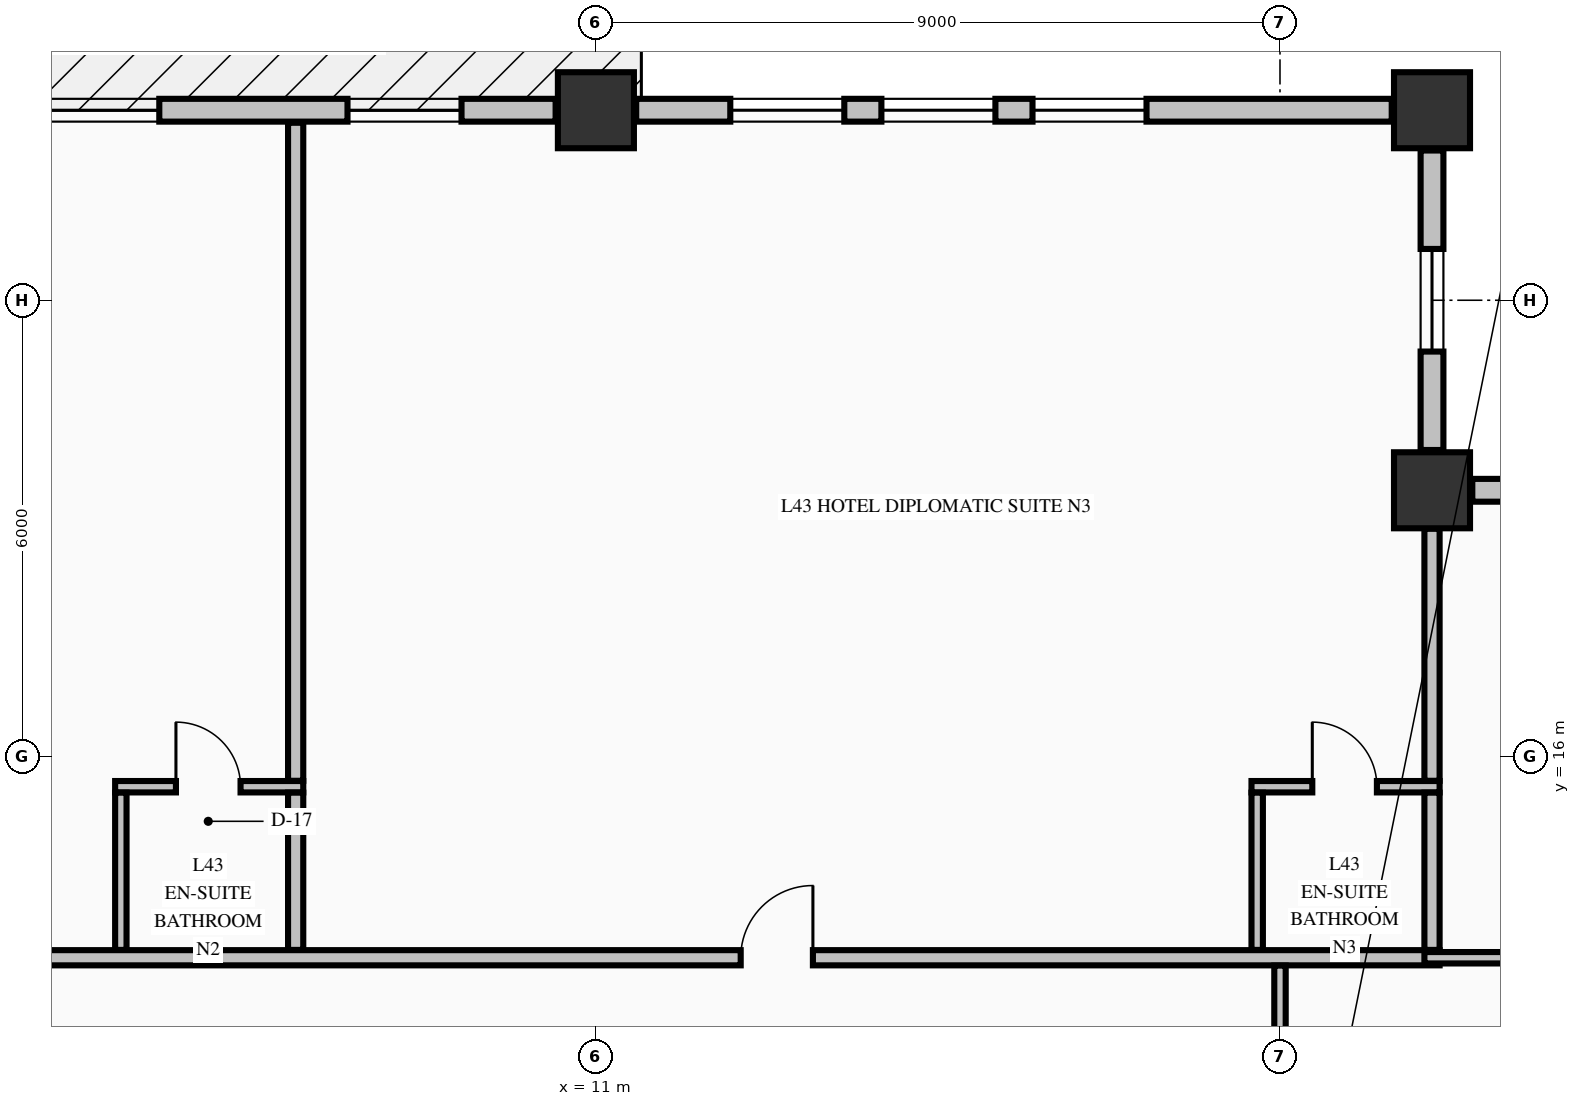
"""IFC4 building model, lengths in metres.
Left out: names, types, materials, properties, quantities, classifications, styles, units other than length and angle.
Written with IfcOpenShell. Run it as: python <this file> out.ifc"""

import sys

from ifc_helpers import new_model, si_unit, direction, frame, frame_2d, origin, origin_2d, place, context, subcontext, project, spatial, rectangle, extrude, element, fill, save


model = new_model("IFC4")
c1 = context("Model", 3, precision=1e-05, world=origin(), true_north=direction((0.0, 1.0)))
c2 = subcontext(c1, "Body", "Model", "MODEL_VIEW")
j1 = project(units=[si_unit("LENGTHUNIT", "METRE"), si_unit("PLANEANGLEUNIT", "RADIAN")], contexts=[c1])
p1 = place(None, origin())
s1 = spatial("IfcSite", under=j1, at=p1, CompositionType="ELEMENT")
p2 = place(p1, origin())
s2 = spatial("IfcBuilding", under=s1, at=p2, CompositionType="ELEMENT")
p3 = place(p2, frame((0.0, 0.0, 169.46)))
s3 = spatial("IfcBuildingStorey", under=s2, at=p3, CompositionType="ELEMENT", Elevation=169.46)
for number, where, z_axis, x_axis in (
    (1, (11.0, 24.5, -0.25), (0.0, 0.0, 1.0), (1.0, 0.0, 0.0)),
    (2, (22.0, 24.5, -0.25), (0.0, 0.0, 1.0), (1.0, 0.0, 0.0)),
    (3, (22.0, 19.5, -0.25), (0.0, 0.0, 1.0), (1.0, 0.0, 0.0)),
):
    element("IfcColumn", number, at=place(p3, frame(where, z_axis=z_axis, x_axis=x_axis)), inside=s3, PredefinedType="COLUMN", context=c2, shape_type="SweptSolid", body=[
        extrude(rectangle(XDim=1.0, YDim=1.0, at=origin_2d()), origin(), (0.0, 0.0, 1.0), 3.4),
    ])
p4 = place(p3, frame((26.47, 19.5, 0.0), z_axis=(0.0, 0.0, 1.0), x_axis=(-1.0, 0.0, 0.0)))
e4 = element("IfcWall", 4, at=p4, inside=s3, PredefinedType="STANDARD", context=c2, shape_type="SweptSolid", body=[
    extrude(rectangle(XDim=3.94, YDim=0.3, at=frame_2d((1.97, 0.0))), origin(), (0.0, 0.0, 1.0), 2.542),
])
p5 = place(p4, frame((1.295, 0.0, 0.68)))
e5 = element("IfcOpeningElement", 5, at=p5, cuts=e4, PredefinedType="OPENING", context=c2, shape_type="SweptSolid", body=[
    extrude(rectangle(XDim=1.35, YDim=1.42, at=frame_2d((0.675, 0.71))), frame((0.0, 0.16, 0.0), z_axis=(0.0, -1.0, 0.0), x_axis=(1.0, 0.0, 0.0)), (0.0, 0.0, 1.0), 0.32),
])
p6 = place(p3, frame((22.0, 20.03, 0.0), z_axis=(0.0, 0.0, 1.0), x_axis=(0.0, 1.0, 0.0)))
e6 = element("IfcWall", 6, at=p6, inside=s3, PredefinedType="STANDARD", context=c2, shape_type="SweptSolid", body=[
    extrude(rectangle(XDim=3.94, YDim=0.3, at=frame_2d((1.97, 0.0))), origin(), (0.0, 0.0, 1.0), 2.542),
])
p7 = place(p6, frame((1.295, 0.0, 0.68)))
e7 = element("IfcOpeningElement", 7, at=p7, cuts=e6, PredefinedType="OPENING", context=c2, shape_type="SweptSolid", body=[
    extrude(rectangle(XDim=1.35, YDim=1.42, at=frame_2d((0.675, 0.71))), frame((0.0, 0.16, 0.0), z_axis=(0.0, -1.0, 0.0), x_axis=(1.0, 0.0, 0.0)), (0.0, 0.0, 1.0), 0.32),
])
p8 = place(p3, frame((10.47, 24.5, 0.0), z_axis=(0.0, 0.0, 1.0), x_axis=(-1.0, 0.0, 0.0)))
e8 = element("IfcWall", 8, at=p8, inside=s3, PredefinedType="STANDARD", context=c2, shape_type="SweptSolid", body=[
    extrude(rectangle(XDim=9.94, YDim=0.3, at=frame_2d((4.97, 0.0))), origin(), (0.0, 0.0, 1.0), 2.542),
])
p9 = place(p8, frame((1.238, 0.0, 0.72)))
e9 = element("IfcOpeningElement", 9, at=p9, cuts=e8, PredefinedType="OPENING", context=c2, shape_type="SweptSolid", body=[
    extrude(rectangle(XDim=1.5, YDim=1.6, at=frame_2d((0.75, 0.8))), frame((0.0, 0.16, 0.0), z_axis=(0.0, -1.0, 0.0), x_axis=(1.0, 0.0, 0.0)), (0.0, 0.0, 1.0), 0.32),
])
p10 = place(p8, frame((5.214, 0.0, 0.72)))
e10 = element("IfcOpeningElement", 10, at=p10, cuts=e8, PredefinedType="OPENING", context=c2, shape_type="SweptSolid", body=[
    extrude(rectangle(XDim=1.5, YDim=1.6, at=frame_2d((0.75, 0.8))), frame((0.0, 0.16, 0.0), z_axis=(0.0, -1.0, 0.0), x_axis=(1.0, 0.0, 0.0)), (0.0, 0.0, 1.0), 0.32),
])
p11 = place(p8, frame((7.202, 0.0, 0.72)))
e11 = element("IfcOpeningElement", 11, at=p11, cuts=e8, PredefinedType="OPENING", context=c2, shape_type="SweptSolid", body=[
    extrude(rectangle(XDim=1.5, YDim=1.6, at=frame_2d((0.75, 0.8))), frame((0.0, 0.16, 0.0), z_axis=(0.0, -1.0, 0.0), x_axis=(1.0, 0.0, 0.0)), (0.0, 0.0, 1.0), 0.32),
])
p12 = place(p3, frame((21.47, 24.5, 0.0), z_axis=(0.0, 0.0, 1.0), x_axis=(-1.0, 0.0, 0.0)))
e12 = element("IfcWall", 12, at=p12, inside=s3, PredefinedType="STANDARD", context=c2, shape_type="SweptSolid", body=[
    extrude(rectangle(XDim=9.94, YDim=0.3, at=frame_2d((4.97, 0.0))), origin(), (0.0, 0.0, 1.0), 2.542),
])
p13 = place(p12, frame((3.226, 0.0, 0.72)))
e13 = element("IfcOpeningElement", 13, at=p13, cuts=e12, PredefinedType="OPENING", context=c2, shape_type="SweptSolid", body=[
    extrude(rectangle(XDim=1.5, YDim=1.6, at=frame_2d((0.75, 0.8))), frame((0.0, 0.16, 0.0), z_axis=(0.0, -1.0, 0.0), x_axis=(1.0, 0.0, 0.0)), (0.0, 0.0, 1.0), 0.32),
])
p14 = place(p12, frame((5.214, 0.0, 0.72)))
e14 = element("IfcOpeningElement", 14, at=p14, cuts=e12, PredefinedType="OPENING", context=c2, shape_type="SweptSolid", body=[
    extrude(rectangle(XDim=1.5, YDim=1.6, at=frame_2d((0.75, 0.8))), frame((0.0, 0.16, 0.0), z_axis=(0.0, -1.0, 0.0), x_axis=(1.0, 0.0, 0.0)), (0.0, 0.0, 1.0), 0.32),
])
p15 = place(p12, frame((7.202, 0.0, 0.72)))
e15 = element("IfcOpeningElement", 15, at=p15, cuts=e12, PredefinedType="OPENING", context=c2, shape_type="SweptSolid", body=[
    extrude(rectangle(XDim=1.5, YDim=1.6, at=frame_2d((0.75, 0.8))), frame((0.0, 0.16, 0.0), z_axis=(0.0, -1.0, 0.0), x_axis=(1.0, 0.0, 0.0)), (0.0, 0.0, 1.0), 0.32),
])
p16 = place(p3, frame((-17.1, 13.35, 0.0), z_axis=(0.0, 0.0, 1.0), x_axis=(1.0, 0.0, 0.0)))
e16 = element("IfcWall", 16, at=p16, inside=s3, PredefinedType="PARTITIONING", context=c2, shape_type="SweptSolid", body=[
    extrude(rectangle(XDim=39.2, YDim=0.2, at=frame_2d((19.6, 0.0))), origin(), (0.0, 0.0, 1.0), 3.15),
])
p17 = place(p16, frame((3.695, 0.0, 0.0)))
e17 = element("IfcOpeningElement", 17, at=p17, cuts=e16, PredefinedType="OPENING", context=c2, shape_type="SweptSolid", body=[
    extrude(rectangle(XDim=0.95, YDim=2.15, at=frame_2d((0.475, 1.075))), frame((0.0, 0.11, 0.0), z_axis=(0.0, -1.0, 0.0), x_axis=(1.0, 0.0, 0.0)), (0.0, 0.0, 1.0), 0.22),
])
p18 = place(p16, frame((19.725, 0.0, 0.0)))
e18 = element("IfcOpeningElement", 18, at=p18, cuts=e16, PredefinedType="OPENING", context=c2, shape_type="SweptSolid", body=[
    extrude(rectangle(XDim=0.95, YDim=2.15, at=frame_2d((0.475, 1.075))), frame((0.0, 0.11, 0.0), z_axis=(0.0, -1.0, 0.0), x_axis=(1.0, 0.0, 0.0)), (0.0, 0.0, 1.0), 0.22),
])
p19 = place(p16, frame((30.005, 0.0, 0.0)))
e19 = element("IfcOpeningElement", 19, at=p19, cuts=e16, PredefinedType="OPENING", context=c2, shape_type="SweptSolid", body=[
    extrude(rectangle(XDim=0.95, YDim=2.15, at=frame_2d((0.475, 1.075))), frame((0.0, 0.11, 0.0), z_axis=(0.0, -1.0, 0.0), x_axis=(1.0, 0.0, 0.0)), (0.0, 0.0, 1.0), 0.22),
])
p20 = place(p3, frame((21.9, 13.35, 0.0), z_axis=(0.0, 0.0, 1.0), x_axis=(1.0, 0.0, 0.0)))
e20 = element("IfcWall", 20, at=p20, inside=s3, PredefinedType="PARTITIONING", context=c2, shape_type="SweptSolid", body=[
    extrude(rectangle(XDim=4.935, YDim=0.15, at=frame_2d((2.468, 0.0))), origin(), (0.0, 0.0, 1.0), 3.15),
])
p21 = place(p3, frame((4.675, 15.6, 0.0), z_axis=(0.0, 0.0, 1.0), x_axis=(1.0, 0.0, 0.0)))
e21 = element("IfcWall", 21, at=p21, inside=s3, PredefinedType="PARTITIONING", context=c2, shape_type="SweptSolid", body=[
    extrude(rectangle(XDim=2.475, YDim=0.15, at=frame_2d((1.237, 0.0))), origin(), (0.0, 0.0, 1.0), 3.15),
])
p22 = place(p21, frame((0.8, 0.0, 0.0)))
e22 = element("IfcOpeningElement", 22, at=p22, cuts=e21, PredefinedType="OPENING", context=c2, shape_type="SweptSolid", body=[
    extrude(rectangle(XDim=0.85, YDim=2.1, at=frame_2d((0.425, 1.05))), frame((0.0, 0.085, 0.0), z_axis=(0.0, -1.0, 0.0), x_axis=(1.0, 0.0, 0.0)), (0.0, 0.0, 1.0), 0.17),
])
p23 = place(p3, frame((19.625, 15.6, 0.0), z_axis=(0.0, 0.0, 1.0), x_axis=(1.0, 0.0, 0.0)))
e23 = element("IfcWall", 23, at=p23, inside=s3, PredefinedType="PARTITIONING", context=c2, shape_type="SweptSolid", body=[
    extrude(rectangle(XDim=2.475, YDim=0.15, at=frame_2d((1.238, 0.0))), origin(), (0.0, 0.0, 1.0), 3.15),
])
p24 = place(p23, frame((0.8, 0.0, 0.0)))
e24 = element("IfcOpeningElement", 24, at=p24, cuts=e23, PredefinedType="OPENING", context=c2, shape_type="SweptSolid", body=[
    extrude(rectangle(XDim=0.85, YDim=2.1, at=frame_2d((0.425, 1.05))), frame((0.0, 0.085, 0.0), z_axis=(0.0, -1.0, 0.0), x_axis=(1.0, 0.0, 0.0)), (0.0, 0.0, 1.0), 0.17),
])
p25 = place(p3, frame((4.75, 13.453, 0.0), z_axis=(0.0, 0.0, 1.0), x_axis=(0.0, 1.0, 0.0)))
e25 = element("IfcWall", 25, at=p25, inside=s3, PredefinedType="PARTITIONING", context=c2, shape_type="SweptSolid", body=[
    extrude(rectangle(XDim=2.069, YDim=0.15, at=frame_2d((1.035, 0.0))), origin(), (0.0, 0.0, 1.0), 3.15),
])
p26 = place(p3, frame((7.05, 13.453, 0.0), z_axis=(0.0, 0.0, 1.0), x_axis=(0.0, 1.0, 0.0)))
e26 = element("IfcWall", 26, at=p26, inside=s3, PredefinedType="PARTITIONING", context=c2, shape_type="SweptSolid", body=[
    extrude(rectangle(XDim=2.069, YDim=0.2, at=frame_2d((1.035, 0.0))), origin(), (0.0, 0.0, 1.0), 3.15),
])
p27 = place(p3, frame((7.05, 15.678, 0.0), z_axis=(0.0, 0.0, 1.0), x_axis=(0.0, 1.0, 0.0)))
e27 = element("IfcWall", 27, at=p27, inside=s3, PredefinedType="PARTITIONING", context=c2, shape_type="SweptSolid", body=[
    extrude(rectangle(XDim=8.657, YDim=0.2, at=frame_2d((4.329, 0.0))), origin(), (0.0, 0.0, 1.0), 3.15),
])
p28 = place(p3, frame((19.7, 13.453, 0.0), z_axis=(0.0, 0.0, 1.0), x_axis=(0.0, 1.0, 0.0)))
e28 = element("IfcWall", 28, at=p28, inside=s3, PredefinedType="PARTITIONING", context=c2, shape_type="SweptSolid", body=[
    extrude(rectangle(XDim=2.069, YDim=0.15, at=frame_2d((1.035, 0.0))), origin(), (0.0, 0.0, 1.0), 2.342),
])
p29 = place(p3, frame((20.0, 10.931, 0.0), z_axis=(0.0, 0.0, 1.0), x_axis=(0.0, 1.0, 0.0)))
e29 = element("IfcWall", 29, at=p29, inside=s3, PredefinedType="PARTITIONING", context=c2, shape_type="SweptSolid", body=[
    extrude(rectangle(XDim=2.316, YDim=0.15, at=frame_2d((1.158, 0.0))), origin(), (0.0, 0.0, 1.0), 2.342),
])
p30 = place(p29, frame((0.524, 0.0, 0.0)))
e30 = element("IfcOpeningElement", 30, at=p30, cuts=e29, PredefinedType="OPENING", context=c2, shape_type="SweptSolid", body=[
    extrude(rectangle(XDim=0.95, YDim=2.15, at=frame_2d((0.475, 1.075))), frame((0.0, 0.085, 0.0), z_axis=(0.0, -1.0, 0.0), x_axis=(1.0, 0.0, 0.0)), (0.0, 0.0, 1.0), 0.17),
])
p31 = place(p3, frame((22.0, 13.453, 0.0), z_axis=(0.0, 0.0, 1.0), x_axis=(0.0, 1.0, 0.0)))
e31 = element("IfcWall", 31, at=p31, inside=s3, PredefinedType="PARTITIONING", context=c2, shape_type="SweptSolid", body=[
    extrude(rectangle(XDim=2.069, YDim=0.2, at=frame_2d((1.035, 0.0))), origin(), (0.0, 0.0, 1.0), 3.15),
])
p32 = place(p3, frame((22.0, 15.678, 0.0), z_axis=(0.0, 0.0, 1.0), x_axis=(0.0, 1.0, 0.0)))
e32 = element("IfcWall", 32, at=p32, inside=s3, PredefinedType="PARTITIONING", context=c2, shape_type="SweptSolid", body=[
    extrude(rectangle(XDim=3.316, YDim=0.2, at=frame_2d((1.658, 0.0))), origin(), (0.0, 0.0, 1.0), 3.15),
])
p33 = place(p7, origin())
e33 = element("IfcWindow", 33, at=p33, inside=s3, PartitioningType="SINGLE_PANEL", PredefinedType="WINDOW", context=c2, shape_type="SweptSolid", body=[
    extrude(rectangle(XDim=1.35, YDim=1.42, at=frame_2d((0.675, 0.71))), frame((0.0, 0.03, 0.0), z_axis=(0.0, -1.0, 0.0), x_axis=(1.0, 0.0, 0.0)), (0.0, 0.0, 1.0), 0.06),
])
fill(e7, e33)
p34 = place(p9, origin())
e34 = element("IfcWindow", 34, at=p34, inside=s3, PartitioningType="SINGLE_PANEL", PredefinedType="WINDOW", context=c2, shape_type="SweptSolid", body=[
    extrude(rectangle(XDim=1.5, YDim=1.6, at=frame_2d((0.75, 0.8))), frame((0.0, 0.03, 0.0), z_axis=(0.0, -1.0, 0.0), x_axis=(1.0, 0.0, 0.0)), (0.0, 0.0, 1.0), 0.06),
])
fill(e9, e34)
p35 = place(p10, origin())
e35 = element("IfcWindow", 35, at=p35, inside=s3, PartitioningType="SINGLE_PANEL", PredefinedType="WINDOW", context=c2, shape_type="SweptSolid", body=[
    extrude(rectangle(XDim=1.5, YDim=1.6, at=frame_2d((0.75, 0.8))), frame((0.0, 0.03, 0.0), z_axis=(0.0, -1.0, 0.0), x_axis=(1.0, 0.0, 0.0)), (0.0, 0.0, 1.0), 0.06),
])
fill(e10, e35)
p36 = place(p13, origin())
e36 = element("IfcWindow", 36, at=p36, inside=s3, PartitioningType="SINGLE_PANEL", PredefinedType="WINDOW", context=c2, shape_type="SweptSolid", body=[
    extrude(rectangle(XDim=1.5, YDim=1.6, at=frame_2d((0.75, 0.8))), frame((0.0, 0.03, 0.0), z_axis=(0.0, -1.0, 0.0), x_axis=(1.0, 0.0, 0.0)), (0.0, 0.0, 1.0), 0.06),
])
fill(e13, e36)
p37 = place(p14, origin())
e37 = element("IfcWindow", 37, at=p37, inside=s3, PartitioningType="SINGLE_PANEL", PredefinedType="WINDOW", context=c2, shape_type="SweptSolid", body=[
    extrude(rectangle(XDim=1.5, YDim=1.6, at=frame_2d((0.75, 0.8))), frame((0.0, 0.03, 0.0), z_axis=(0.0, -1.0, 0.0), x_axis=(1.0, 0.0, 0.0)), (0.0, 0.0, 1.0), 0.06),
])
fill(e14, e37)
p38 = place(p15, origin())
e38 = element("IfcWindow", 38, at=p38, inside=s3, PartitioningType="SINGLE_PANEL", PredefinedType="WINDOW", context=c2, shape_type="SweptSolid", body=[
    extrude(rectangle(XDim=1.5, YDim=1.6, at=frame_2d((0.75, 0.8))), frame((0.0, 0.03, 0.0), z_axis=(0.0, -1.0, 0.0), x_axis=(1.0, 0.0, 0.0)), (0.0, 0.0, 1.0), 0.06),
])
fill(e15, e38)
p39 = place(p22, origin())
e39 = element("IfcDoor", 39, at=p39, inside=s3, OperationType="SINGLE_SWING_LEFT", PredefinedType="DOOR", context=c2, shape_type="SweptSolid", body=[
    extrude(rectangle(XDim=0.85, YDim=2.1, at=frame_2d((0.425, 1.05))), frame((0.0, 0.025, 0.0), z_axis=(0.0, -1.0, 0.0), x_axis=(1.0, 0.0, 0.0)), (0.0, 0.0, 1.0), 0.05),
])
fill(e22, e39)
p40 = place(p19, origin())
e40 = element("IfcDoor", 40, at=p40, inside=s3, OperationType="SINGLE_SWING_RIGHT", PredefinedType="DOOR", context=c2, shape_type="SweptSolid", body=[
    extrude(rectangle(XDim=0.95, YDim=2.15, at=frame_2d((0.475, 1.075))), frame((0.0, 0.025, 0.0), z_axis=(0.0, -1.0, 0.0), x_axis=(1.0, 0.0, 0.0)), (0.0, 0.0, 1.0), 0.05),
])
fill(e19, e40)
p41 = place(p24, origin())
e41 = element("IfcDoor", 41, at=p41, inside=s3, OperationType="SINGLE_SWING_LEFT", PredefinedType="DOOR", context=c2, shape_type="SweptSolid", body=[
    extrude(rectangle(XDim=0.85, YDim=2.1, at=frame_2d((0.425, 1.05))), frame((0.0, 0.025, 0.0), z_axis=(0.0, -1.0, 0.0), x_axis=(1.0, 0.0, 0.0)), (0.0, 0.0, 1.0), 0.05),
])
fill(e24, e41)
save(model, sys.argv[1])
